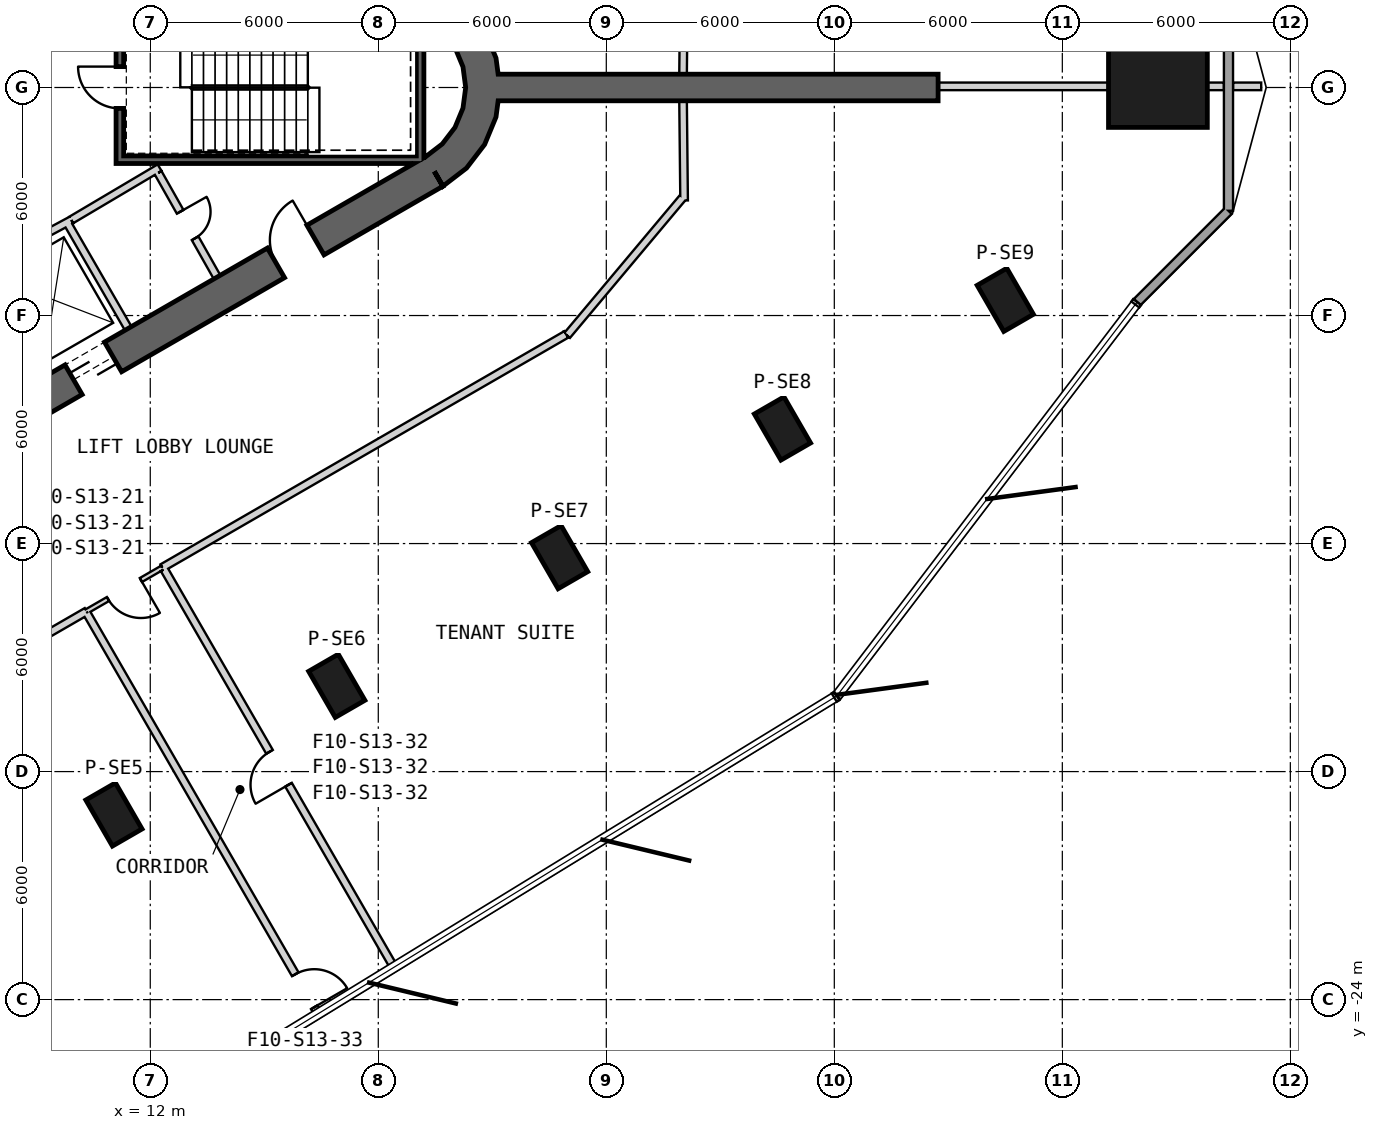
"""IFC4 building model, lengths in metres.
Left out: names, types, materials, properties, quantities, classifications, styles, units other than length and angle.
Written with IfcOpenShell. Run it as: python <this file> out.ifc"""

import sys

from ifc_helpers import new_model, si_unit, direction, frame, frame_2d, origin, origin_2d, place, context, subcontext, project, spatial, polyline, rectangle, outline, extrude, element, fill, save


model = new_model("IFC4")
c1 = context("Model", 3, precision=1e-05, world=origin(), true_north=direction((0.0, 1.0)))
c2 = subcontext(c1, "Body", "Model", "MODEL_VIEW")
j1 = project(units=[si_unit("LENGTHUNIT", "METRE"), si_unit("PLANEANGLEUNIT", "RADIAN")], contexts=[c1])
p1 = place(None, origin())
s1 = spatial("IfcSite", under=j1, at=p1, CompositionType="ELEMENT")
p2 = place(p1, origin())
s2 = spatial("IfcBuilding", under=s1, at=p2, CompositionType="ELEMENT")
p3 = place(p2, frame((0.0, 0.0, 217.2)))
s3 = spatial("IfcBuildingStorey", under=s2, at=p3, CompositionType="ELEMENT", Elevation=217.2)
p4 = place(p3, frame((38.515, 0.0, 0.0), z_axis=(0.0, 0.0, 1.0), x_axis=(1.0, 0.0, 0.0)))
e1 = element("IfcColumn", 1, at=p4, inside=s3, PredefinedType="COLUMN", context=c2, shape_type="SweptSolid", body=[
    extrude(rectangle(XDim=2.6, YDim=2.1, at=origin_2d()), origin(), (0.0, 0.0, 1.0), 4.0),
])
for number, where, z_axis, x_axis in (
    (2, (11.044, -19.129, 0.0), (0.0, 0.0, 1.0), (0.5, -0.866, 0.0)),
    (3, (16.908, -15.743, 0.0), (0.0, 0.0, 1.0), (0.5, -0.866, 0.0)),
    (4, (22.772, -12.358, 0.0), (0.0, 0.0, 1.0), (0.5, -0.866, 0.0)),
    (5, (28.635, -8.972, 0.0), (0.0, 0.0, 1.0), (0.5, -0.866, 0.0)),
    (6, (34.5, -5.587, 0.0), (0.0, 0.0, 1.0), (0.5, -0.866, 0.0)),
):
    element("IfcColumn", number, at=place(p3, frame(where, z_axis=z_axis, x_axis=x_axis)), inside=s3, PredefinedType="COLUMN", context=c2, shape_type="SweptSolid", body=[
        extrude(rectangle(XDim=1.4, YDim=0.9, at=origin_2d()), origin(), (0.0, 0.0, 1.0), 4.0),
    ])
p5 = place(p3, frame((-7.825, -17.97, 0.0), z_axis=(0.0, 0.0, 1.0), x_axis=(0.866028369851, 0.499994862586, 0.0)))
e7 = element("IfcWall", 7, at=p5, inside=s3, PredefinedType="SHEAR", context=c2, shape_type="SweptSolid", body=[
    extrude(rectangle(XDim=31.523, YDim=0.9, at=frame_2d((15.762, 0.0))), origin(), (0.0, 0.0, 1.0), 4.0),
])
p6 = place(p5, frame((7.062, 0.0, 0.0)))
e8 = element("IfcOpeningElement", 8, at=p6, cuts=e7, PredefinedType="OPENING", context=c2, shape_type="SweptSolid", body=[
    extrude(rectangle(XDim=1.2, YDim=2.4, at=frame_2d((0.6, 1.2))), frame((0.0, 0.46, 0.0), z_axis=(0.0, -1.0, 0.0), x_axis=(1.0, 0.0, 0.0)), (0.0, 0.0, 1.0), 0.92),
])
p7 = place(p5, frame((9.762, 0.0, 0.0)))
e9 = element("IfcOpeningElement", 9, at=p7, cuts=e7, PredefinedType="OPENING", context=c2, shape_type="SweptSolid", body=[
    extrude(rectangle(XDim=1.2, YDim=2.4, at=frame_2d((0.6, 1.2))), frame((0.0, 0.46, 0.0), z_axis=(0.0, -1.0, 0.0), x_axis=(1.0, 0.0, 0.0)), (0.0, 0.0, 1.0), 0.92),
])
p8 = place(p5, frame((12.462, 0.0, 0.0)))
e10 = element("IfcOpeningElement", 10, at=p8, cuts=e7, PredefinedType="OPENING", context=c2, shape_type="SweptSolid", body=[
    extrude(rectangle(XDim=1.2, YDim=2.4, at=frame_2d((0.6, 1.2))), frame((0.0, 0.46, 0.0), z_axis=(0.0, -1.0, 0.0), x_axis=(1.0, 0.0, 0.0)), (0.0, 0.0, 1.0), 0.92),
])
p9 = place(p5, frame((15.162, 0.0, 0.0)))
e11 = element("IfcOpeningElement", 11, at=p9, cuts=e7, PredefinedType="OPENING", context=c2, shape_type="SweptSolid", body=[
    extrude(rectangle(XDim=1.2, YDim=2.4, at=frame_2d((0.6, 1.2))), frame((0.0, 0.46, 0.0), z_axis=(0.0, -1.0, 0.0), x_axis=(1.0, 0.0, 0.0)), (0.0, 0.0, 1.0), 0.92),
])
p10 = place(p5, frame((17.862, 0.0, 0.0)))
e12 = element("IfcOpeningElement", 12, at=p10, cuts=e7, PredefinedType="OPENING", context=c2, shape_type="SweptSolid", body=[
    extrude(rectangle(XDim=1.2, YDim=2.4, at=frame_2d((0.6, 1.2))), frame((0.0, 0.46, 0.0), z_axis=(0.0, -1.0, 0.0), x_axis=(1.0, 0.0, 0.0)), (0.0, 0.0, 1.0), 0.92),
])
p11 = place(p5, frame((20.562, 0.0, 0.0)))
e13 = element("IfcOpeningElement", 13, at=p11, cuts=e7, PredefinedType="OPENING", context=c2, shape_type="SweptSolid", body=[
    extrude(rectangle(XDim=1.2, YDim=2.4, at=frame_2d((0.6, 1.2))), frame((0.0, 0.46, 0.0), z_axis=(0.0, -1.0, 0.0), x_axis=(1.0, 0.0, 0.0)), (0.0, 0.0, 1.0), 0.92),
])
p12 = place(p5, frame((26.712, 0.0, 0.0)))
e14 = element("IfcOpeningElement", 14, at=p12, cuts=e7, PredefinedType="OPENING", context=c2, shape_type="SweptSolid", body=[
    extrude(rectangle(XDim=1.2, YDim=2.4, at=frame_2d((0.6, 1.2))), frame((0.0, 0.46, 0.0), z_axis=(0.0, -1.0, 0.0), x_axis=(1.0, 0.0, 0.0)), (0.0, 0.0, 1.0), 0.92),
])
p13 = place(p5, frame((3.612, 0.0, 0.0)))
e15 = element("IfcOpeningElement", 15, at=p13, cuts=e7, PredefinedType="OPENING", context=c2, shape_type="SweptSolid", body=[
    extrude(rectangle(XDim=1.2, YDim=2.4, at=frame_2d((0.6, 1.2))), frame((0.0, 0.46, 0.0), z_axis=(0.0, -1.0, 0.0), x_axis=(1.0, 0.0, 0.0)), (0.0, 0.0, 1.0), 0.92),
])
p14 = place(p3, origin())
e16 = element("IfcWall", 16, at=p14, inside=s3, PredefinedType="SHEAR", context=c2, shape_type="SweptSolid", body=[
    extrude(outline(polyline([(19.7, -2.598), (20.321, -2.121), (20.798, -1.5), (21.098, -0.777), (21.2, 0.0), (21.098, 0.777), (20.798, 1.5), (20.321, 2.121), (19.7, 2.598), (19.25, 1.819), (19.685, 1.485), (20.019, 1.05), (20.229, 0.543), (20.3, 0.0), (20.229, -0.543), (20.019, -1.05), (19.685, -1.485), (19.25, -1.819), (19.7, -2.598)])), origin(), (0.0, 0.0, 1.0), 4.0),
])
p15 = place(p3, frame((21.15, 0.0, 0.0), z_axis=(0.0, 0.0, 1.0), x_axis=(1.0, 0.0, 0.0)))
e17 = element("IfcWall", 17, at=p15, inside=s3, PredefinedType="SHEAR", context=c2, shape_type="SweptSolid", body=[
    extrude(rectangle(XDim=11.581, YDim=0.7, at=frame_2d((5.791, 0.0))), origin(), (0.0, 0.0, 1.0), 4.0),
])
p16 = place(p3, frame((37.969, -5.646, 0.0), z_axis=(0.0, 0.0, 1.0), x_axis=(0.70714270502, 0.707070855528, 0.0)))
e18 = element("IfcWall", 18, at=p16, inside=s3, PredefinedType="SOLIDWALL", context=c2, shape_type="SweptSolid", body=[
    extrude(rectangle(XDim=3.398, YDim=0.24, at=frame_2d((1.699, 0.0))), origin(), (0.0, 0.0, 1.0), 3.7),
])
p17 = place(p3, frame((40.372, -3.243, 0.0), z_axis=(0.0, 0.0, 1.0), x_axis=(0.0, 1.0, 0.0)))
e19 = element("IfcWall", 19, at=p17, inside=s3, PredefinedType="SOLIDWALL", context=c2, shape_type="SweptSolid", body=[
    extrude(rectangle(XDim=6.487, YDim=0.24, at=frame_2d((3.243, 0.0))), origin(), (0.0, 0.0, 1.0), 3.7),
])
p18 = place(p3, frame((9.795, -3.525, 0.0), z_axis=(0.0, 0.0, 1.0), x_axis=(0.499984717929, -0.866034226713, 0.0)))
e20 = element("IfcWall", 20, at=p18, inside=s3, PredefinedType="PLUMBINGWALL", context=c2, shape_type="SweptSolid", body=[
    extrude(rectangle(XDim=3.25, YDim=0.2, at=frame_2d((1.625, 0.0))), origin(), (0.0, 0.0, 1.0), 3.7),
])
p19 = place(p3, frame((8.974, -3.999, 0.0), z_axis=(0.0, 0.0, 1.0), x_axis=(0.880907015104, 0.473289373154, 0.0)))
e21 = element("IfcWall", 21, at=p19, inside=s3, PredefinedType="PLUMBINGWALL", context=c2, shape_type="SweptSolid", body=[
    extrude(rectangle(XDim=1.078, YDim=0.2, at=frame_2d((0.539, 0.0))), origin(), (0.0, 0.0, 1.0), 3.7),
])
p20 = place(p3, frame((19.1, -2.0, -0.3), z_axis=(0.0, 0.0, 1.0), x_axis=(0.0, 1.0, 0.0)))
e22 = element("IfcWall", 22, at=p20, inside=s3, PredefinedType="SHEAR", context=c2, shape_type="SweptSolid", body=[
    extrude(rectangle(XDim=3.8, YDim=0.2, at=frame_2d((1.9, 0.0))), origin(), (0.0, 0.0, 1.0), 4.0),
])
p21 = place(p3, frame((11.1, -1.9, -0.3), z_axis=(0.0, 0.0, 1.0), x_axis=(1.0, 0.0, 0.0)))
e23 = element("IfcWall", 23, at=p21, inside=s3, PredefinedType="SHEAR", context=c2, shape_type="SweptSolid", body=[
    extrude(rectangle(XDim=7.9, YDim=0.2, at=frame_2d((3.95, 0.0))), origin(), (0.0, 0.0, 1.0), 4.0),
])
p22 = place(p3, frame((11.2, -1.8, -0.3), z_axis=(0.0, 0.0, 1.0), x_axis=(0.0, 1.0, 0.0)))
e24 = element("IfcWall", 24, at=p22, inside=s3, PredefinedType="SHEAR", context=c2, shape_type="SweptSolid", body=[
    extrude(rectangle(XDim=3.6, YDim=0.2, at=frame_2d((1.8, 0.0))), origin(), (0.0, 0.0, 1.0), 4.0),
])
p23 = place(p22, frame((1.25, 0.0, 0.3)))
e25 = element("IfcOpeningElement", 25, at=p23, cuts=e24, PredefinedType="OPENING", context=c2, shape_type="SweptSolid", body=[
    extrude(rectangle(XDim=1.1, YDim=2.1, at=frame_2d((0.55, 1.05))), frame((0.0, 0.11, 0.0), z_axis=(0.0, -1.0, 0.0), x_axis=(1.0, 0.0, 0.0)), (0.0, 0.0, 1.0), 0.22),
])
p24 = place(p3, frame((12.245, -2.109, 0.0), z_axis=(0.0, 0.0, 1.0), x_axis=(-0.860414880418, -0.509594185166, 0.0)))
e26 = element("IfcWall", 26, at=p24, inside=s3, PredefinedType="PARTITIONING", context=c2, shape_type="SweptSolid", body=[
    extrude(rectangle(XDim=2.7, YDim=0.2, at=frame_2d((1.35, 0.0))), origin(), (0.0, 0.0, 1.0), 3.7),
])
p25 = place(p3, frame((13.758, -4.99, 0.0), z_axis=(0.0, 0.0, 1.0), x_axis=(-0.491993409184, 0.87059892334, 0.0)))
e27 = element("IfcWall", 27, at=p25, inside=s3, PredefinedType="PARTITIONING", context=c2, shape_type="SweptSolid", body=[
    extrude(rectangle(XDim=3.15, YDim=0.2, at=frame_2d((1.575, 0.0))), origin(), (0.0, 0.0, 1.0), 3.7),
])
p26 = place(p25, frame((1.175, 0.0, 0.0)))
e28 = element("IfcOpeningElement", 28, at=p26, cuts=e27, PredefinedType="OPENING", context=c2, shape_type="SweptSolid", body=[
    extrude(rectangle(XDim=0.8, YDim=2.1, at=frame_2d((0.4, 1.05))), frame((0.0, 0.11, 0.0), z_axis=(0.0, -1.0, 0.0), x_axis=(1.0, 0.0, 0.0)), (0.0, 0.0, 1.0), 0.22),
])
p27 = place(p3, frame((26.02, 0.35, 0.0), z_axis=(0.0, 0.0, 1.0), x_axis=(0.010532007244, 0.999944536874, 0.0)))
e29 = element("IfcWall", 29, at=p27, inside=s3, PredefinedType="PARTITIONING", context=c2, shape_type="SweptSolid", body=[
    extrude(rectangle(XDim=2.457, YDim=0.2, at=frame_2d((1.229, 0.0))), origin(), (0.0, 0.0, 1.0), 3.7),
])
p28 = place(p3, frame((12.317, -12.634, 0.0), z_axis=(0.0, 0.0, 1.0), x_axis=(-0.86602648383, -0.499998129301, 0.0)))
e30 = element("IfcWall", 30, at=p28, inside=s3, PredefinedType="PARTITIONING", context=c2, shape_type="SweptSolid", body=[
    extrude(rectangle(XDim=2.3, YDim=0.12, at=frame_2d((1.15, 0.0))), origin(), (0.0, 0.0, 1.0), 3.7),
])
p29 = place(p28, frame((0.65, 0.0, 0.0)))
e31 = element("IfcOpeningElement", 31, at=p29, cuts=e30, PredefinedType="OPENING", context=c2, shape_type="SweptSolid", body=[
    extrude(rectangle(XDim=1.0, YDim=2.1, at=frame_2d((0.5, 1.05))), frame((0.0, 0.07, 0.0), z_axis=(0.0, -1.0, 0.0), x_axis=(1.0, 0.0, 0.0)), (0.0, 0.0, 1.0), 0.14),
])
p30 = place(p3, frame((26.047, -2.972, 0.0), z_axis=(0.0, 0.0, 1.0), x_axis=(-0.010519853563, 0.99994466481, 0.0)))
e32 = element("IfcWall", 32, at=p30, inside=s3, PredefinedType="PARTITIONING", context=c2, shape_type="SweptSolid", body=[
    extrude(rectangle(XDim=2.623, YDim=0.2, at=frame_2d((1.311, 0.0))), origin(), (0.0, 0.0, 1.0), 3.7),
])
p31 = place(p3, frame((22.968, -6.524, 0.0), z_axis=(0.0, 0.0, 1.0), x_axis=(0.642764400317, 0.766063917493, 0.0)))
e33 = element("IfcWall", 33, at=p31, inside=s3, PredefinedType="PARTITIONING", context=c2, shape_type="SweptSolid", body=[
    extrude(rectangle(XDim=4.74, YDim=0.2, at=frame_2d((2.37, 0.0))), origin(), (0.0, 0.0, 1.0), 2.78),
])
p32 = place(p3, frame((-6.019, -23.22, 0.0), z_axis=(0.0, 0.0, 1.0), x_axis=(0.86602143297, 0.50000687759, 0.0)))
e34 = element("IfcWall", 34, at=p32, inside=s3, PredefinedType="PARTITIONING", context=c2, shape_type="SweptSolid", body=[
    extrude(rectangle(XDim=18.873, YDim=0.2, at=frame_2d((9.437, 0.0))), origin(), (0.0, 0.0, 1.0), 2.88),
])
p33 = place(p3, frame((12.317, -12.634, 0.0), z_axis=(0.0, 0.0, 1.0), x_axis=(0.866028561818, 0.499994530085, 0.0)))
e35 = element("IfcWall", 35, at=p33, inside=s3, PredefinedType="PARTITIONING", context=c2, shape_type="SweptSolid", body=[
    extrude(rectangle(XDim=12.273, YDim=0.2, at=frame_2d((6.136, 0.0))), origin(), (0.0, 0.0, 1.0), 2.88),
])
p34 = place(p3, frame((32.731, 0.03, 0.0), z_axis=(0.0, 0.0, 1.0), x_axis=(1.0, 0.0, 0.0)))
e36 = element("IfcWall", 36, at=p34, inside=s3, PredefinedType="PARTITIONING", context=c2, shape_type="SweptSolid", body=[
    extrude(rectangle(XDim=4.484, YDim=0.2, at=frame_2d((2.242, 0.0))), origin(), (0.0, 0.0, 1.0), 3.27),
])
p35 = place(p3, frame((39.815, 0.03, 0.0), z_axis=(0.0, 0.0, 1.0), x_axis=(1.0, 0.0, 0.0)))
e37 = element("IfcWall", 37, at=p35, inside=s3, PredefinedType="PARTITIONING", context=c2, shape_type="SweptSolid", body=[
    extrude(rectangle(XDim=0.437, YDim=0.2, at=frame_2d((0.218, 0.0))), origin(), (0.0, 0.0, 1.0), 3.7),
])
p36 = place(p3, frame((40.492, 0.03, 0.0), z_axis=(0.0, 0.0, 1.0), x_axis=(1.0, 0.0, 0.0)))
e38 = element("IfcWall", 38, at=p36, inside=s3, PredefinedType="PARTITIONING", context=c2, shape_type="SweptSolid", body=[
    extrude(rectangle(XDim=0.741, YDim=0.2, at=frame_2d((0.371, 0.0))), origin(), (0.0, 0.0, 1.0), 3.7),
])
p37 = place(p3, frame((18.412, -23.15, 0.0), z_axis=(0.0, 0.0, 1.0), x_axis=(-0.500010196161, 0.866019516948, 0.0)))
e39 = element("IfcWall", 39, at=p37, inside=s3, PredefinedType="PARTITIONING", context=c2, shape_type="SweptSolid", body=[
    extrude(rectangle(XDim=12.094, YDim=0.2, at=frame_2d((6.047, 0.0))), origin(), (0.0, 0.0, 1.0), 3.7),
])
p38 = place(p37, frame((5.547, 0.0, 0.0)))
e40 = element("IfcOpeningElement", 40, at=p38, cuts=e39, PredefinedType="OPENING", context=c2, shape_type="SweptSolid", body=[
    extrude(rectangle(XDim=1.0, YDim=2.1, at=frame_2d((0.5, 1.05))), frame((0.0, 0.11, 0.0), z_axis=(0.0, -1.0, 0.0), x_axis=(1.0, 0.0, 0.0)), (0.0, 0.0, 1.0), 0.22),
])
p39 = place(p3, frame((10.338, -13.846, 0.0), z_axis=(0.0, 0.0, 1.0), x_axis=(0.499990787361, -0.866030722639, 0.0)))
e41 = element("IfcWall", 41, at=p39, inside=s3, PredefinedType="PARTITIONING", context=c2, shape_type="SweptSolid", body=[
    extrude(rectangle(XDim=12.155, YDim=0.2, at=frame_2d((6.078, 0.0))), origin(), (0.0, 0.0, 1.0), 3.7),
])
p40 = place(p39, frame((10.955, 0.0, 0.0)))
e42 = element("IfcOpeningElement", 42, at=p40, cuts=e41, PredefinedType="OPENING", context=c2, shape_type="SweptSolid", body=[
    extrude(rectangle(XDim=1.0, YDim=2.1, at=frame_2d((0.5, 1.05))), frame((0.0, 0.11, 0.0), z_axis=(0.0, -1.0, 0.0), x_axis=(1.0, 0.0, 0.0)), (0.0, 0.0, 1.0), 0.22),
])
p41 = place(p23, origin())
e43 = element("IfcDoor", 43, at=p41, inside=s3, OperationType="SINGLE_SWING_LEFT", PredefinedType="USERDEFINED", context=c2, shape_type="SweptSolid", body=[
    extrude(rectangle(XDim=1.1, YDim=2.1, at=frame_2d((0.55, 1.05))), frame((0.0, 0.025, 0.0), z_axis=(0.0, -1.0, 0.0), x_axis=(1.0, 0.0, 0.0)), (0.0, 0.0, 1.0), 0.05),
])
fill(e25, e43)
p42 = place(p26, origin())
e44 = element("IfcDoor", 44, at=p42, inside=s3, OperationType="SINGLE_SWING_LEFT", PredefinedType="USERDEFINED", context=c2, shape_type="SweptSolid", body=[
    extrude(rectangle(XDim=0.8, YDim=2.1, at=frame_2d((0.4, 1.05))), frame((0.0, 0.025, 0.0), z_axis=(0.0, -1.0, 0.0), x_axis=(1.0, 0.0, 0.0)), (0.0, 0.0, 1.0), 0.05),
])
fill(e28, e44)
p43 = place(p29, origin())
e45 = element("IfcDoor", 45, at=p43, inside=s3, OperationType="SINGLE_SWING_RIGHT", PredefinedType="NOTDEFINED", context=c2, shape_type="SweptSolid", body=[
    extrude(rectangle(XDim=1.0, YDim=2.1, at=frame_2d((0.5, 1.05))), frame((0.0, 0.025, 0.0), z_axis=(0.0, -1.0, 0.0), x_axis=(1.0, 0.0, 0.0)), (0.0, 0.0, 1.0), 0.05),
])
fill(e31, e45)
p44 = place(p38, origin())
e46 = element("IfcDoor", 46, at=p44, inside=s3, OperationType="SINGLE_SWING_LEFT", PredefinedType="USERDEFINED", context=c2, shape_type="SweptSolid", body=[
    extrude(rectangle(XDim=1.0, YDim=2.1, at=frame_2d((0.5, 1.05))), frame((0.0, 0.025, 0.0), z_axis=(0.0, -1.0, 0.0), x_axis=(1.0, 0.0, 0.0)), (0.0, 0.0, 1.0), 0.05),
])
fill(e40, e46)
p45 = place(p40, origin())
e47 = element("IfcDoor", 47, at=p45, inside=s3, OperationType="SINGLE_SWING_LEFT", PredefinedType="USERDEFINED", context=c2, shape_type="SweptSolid", body=[
    extrude(rectangle(XDim=1.0, YDim=2.1, at=frame_2d((0.5, 1.05))), frame((0.0, 0.025, 0.0), z_axis=(0.0, -1.0, 0.0), x_axis=(1.0, 0.0, 0.0)), (0.0, 0.0, 1.0), 0.05),
])
fill(e42, e47)
p46 = place(p11, origin())
e48 = element("IfcDoor", 48, at=p46, inside=s3, OperationType="SLIDING_TO_LEFT", PredefinedType="USERDEFINED", context=c2, shape_type="SweptSolid", body=[
    extrude(rectangle(XDim=1.2, YDim=2.4, at=frame_2d((0.6, 1.2))), frame((0.0, 0.025, 0.0), z_axis=(0.0, -1.0, 0.0), x_axis=(1.0, 0.0, 0.0)), (0.0, 0.0, 1.0), 0.05),
])
fill(e13, e48)
p47 = place(p12, origin())
e49 = element("IfcDoor", 49, at=p47, inside=s3, OperationType="SINGLE_SWING_LEFT", PredefinedType="USERDEFINED", context=c2, shape_type="SweptSolid", body=[
    extrude(rectangle(XDim=1.2, YDim=2.4, at=frame_2d((0.6, 1.2))), frame((0.0, 0.025, 0.0), z_axis=(0.0, -1.0, 0.0), x_axis=(1.0, 0.0, 0.0)), (0.0, 0.0, 1.0), 0.05),
])
fill(e14, e49)
save(model, sys.argv[1])
